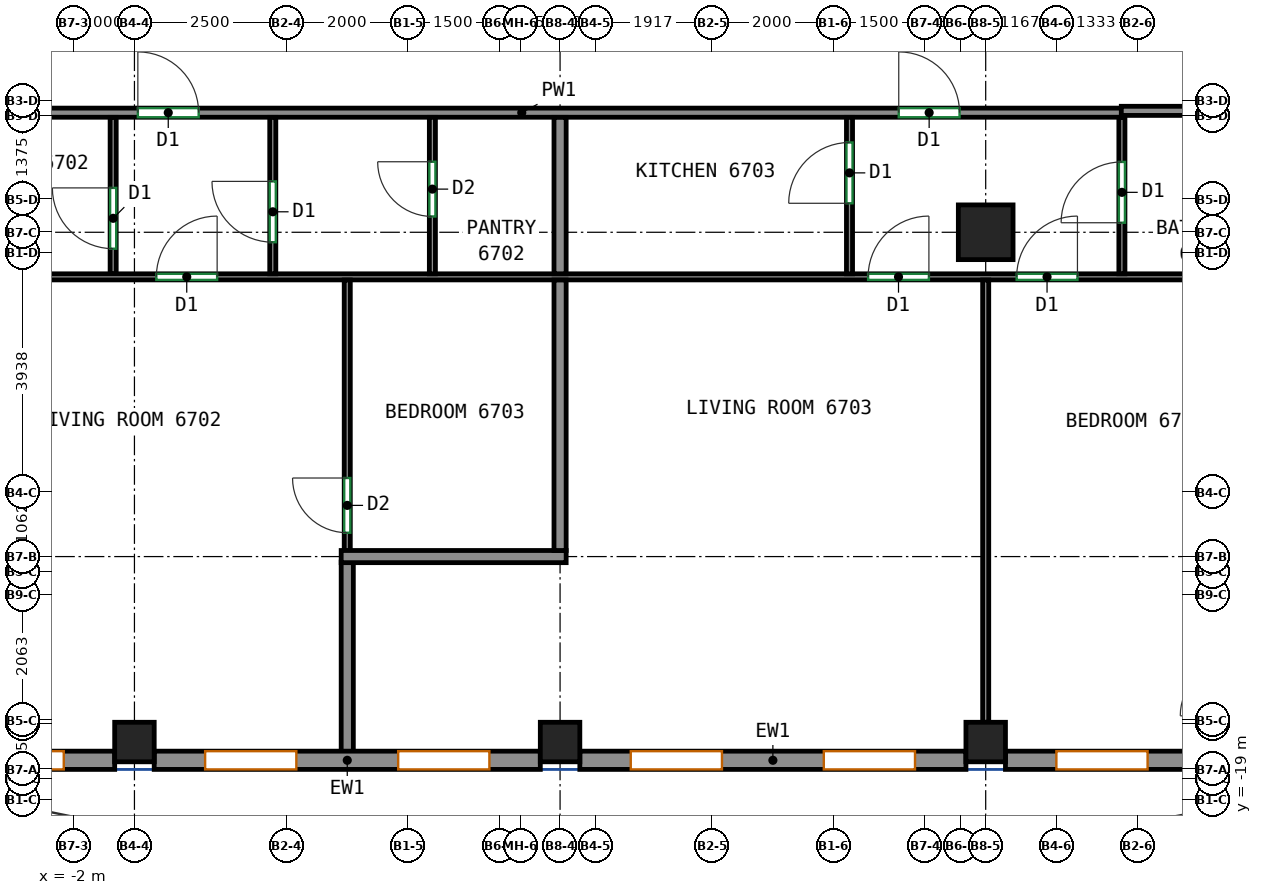
"""IFC4 building model, lengths in metres.
Left out: names, types, materials, properties, quantities, classifications, styles, units other than length and angle.
Written with IfcOpenShell. Run it as: python <this file> out.ifc"""

import sys

from ifc_helpers import new_model, si_unit, direction, frame, frame_2d, origin, origin_2d, place, context, subcontext, project, spatial, rectangle, extrude, source, transform, mapped, element, fill, save


model = new_model("IFC4")
c1 = context("Model", 3, precision=1e-05, world=origin(), true_north=direction((0.0, 1.0)))
c2 = subcontext(c1, "Body", "Model", "MODEL_VIEW")
j1 = project(units=[si_unit("LENGTHUNIT", "METRE"), si_unit("PLANEANGLEUNIT", "RADIAN")], contexts=[c1])
p1 = place(None, origin())
s1 = spatial("IfcSite", under=j1, at=p1, CompositionType="ELEMENT")
p2 = place(p1, origin())
s2 = spatial("IfcBuilding", under=s1, at=p2, CompositionType="ELEMENT")
p3 = place(p2, frame((0.0, 0.0, 273.8)))
s3 = spatial("IfcBuildingStorey", under=s2, at=p3, CompositionType="ELEMENT", Elevation=273.8)
m1 = source(origin(), c2, "Body", "SweptSolid", [
    extrude(rectangle(XDim=0.65, YDim=0.65, at=origin_2d()), origin(), (0.0, 0.0, 1.0), 3.12),
])
for number, where, z_axis, x_axis in (
    (1, (-1.0, -18.05, 0.0), (0.0, 0.0, 1.0), (1.0, 0.0, 0.0)),
    (2, (6.0, -18.05, 0.0), (0.0, 0.0, 1.0), (1.0, 0.0, 0.0)),
    (3, (13.0, -18.05, 0.0), (0.0, 0.0, 1.0), (1.0, 0.0, 0.0)),
):
    element("IfcColumn", number, at=place(p3, frame(where, z_axis=z_axis, x_axis=x_axis)), inside=s3, PredefinedType="COLUMN", context=c2, shape_type="MappedRepresentation", body=[
        mapped(m1, transform((0.0, 0.0, 0.0))),
    ])
m2 = source(origin(), c2, "Body", "SweptSolid", [
    extrude(rectangle(XDim=0.9, YDim=0.9, at=origin_2d()), origin(), (0.0, 0.0, 1.0), 3.12),
])
p4 = place(p3, frame((13.0, -9.667, 0.0), z_axis=(0.0, 0.0, 1.0), x_axis=(1.0, 0.0, 0.0)))
e4 = element("IfcColumn", 4, at=p4, inside=s3, PredefinedType="COLUMN", context=c2, shape_type="MappedRepresentation", body=[
    mapped(m2, transform((0.0, 0.0, 0.0))),
])
m3 = source(origin(), c2, "Body", "SweptSolid", [
    extrude(rectangle(XDim=6.35, YDim=0.3, at=frame_2d((3.175, 0.0))), origin(), (0.0, 0.0, 1.0), 3.12),
])
p5 = place(p3, frame((-7.675, -18.35, 0.0), z_axis=(0.0, 0.0, 1.0), x_axis=(1.0, 0.0, 0.0)))
e5 = element("IfcWall", 5, at=p5, inside=s3, PredefinedType="SOLIDWALL", context=c2, shape_type="MappedRepresentation", body=[
    mapped(m3, transform((0.0, 0.0, 0.0))),
])
p6 = place(p5, frame((0.837, 0.0, 0.8)))
e6 = element("IfcOpeningElement", 6, at=p6, cuts=e5, PredefinedType="OPENING", context=c2, shape_type="SweptSolid", body=[
    extrude(rectangle(XDim=1.5, YDim=2.05, at=frame_2d((0.75, 1.025))), frame((0.0, 0.16, 0.0), z_axis=(0.0, -1.0, 0.0), x_axis=(1.0, 0.0, 0.0)), (0.0, 0.0, 1.0), 0.32),
])
p7 = place(p5, frame((4.012, 0.0, 0.8)))
e7 = element("IfcOpeningElement", 7, at=p7, cuts=e5, PredefinedType="OPENING", context=c2, shape_type="SweptSolid", body=[
    extrude(rectangle(XDim=1.5, YDim=2.05, at=frame_2d((0.75, 1.025))), frame((0.0, 0.16, 0.0), z_axis=(0.0, -1.0, 0.0), x_axis=(1.0, 0.0, 0.0)), (0.0, 0.0, 1.0), 0.32),
])
p8 = place(p3, frame((-0.675, -18.35, 0.0), z_axis=(0.0, 0.0, 1.0), x_axis=(1.0, 0.0, 0.0)))
e8 = element("IfcWall", 8, at=p8, inside=s3, PredefinedType="SOLIDWALL", context=c2, shape_type="MappedRepresentation", body=[
    mapped(m3, transform((0.0, 0.0, 0.0))),
])
p9 = place(p8, frame((0.837, 0.0, 0.8)))
e9 = element("IfcOpeningElement", 9, at=p9, cuts=e8, PredefinedType="OPENING", context=c2, shape_type="SweptSolid", body=[
    extrude(rectangle(XDim=1.5, YDim=2.05, at=frame_2d((0.75, 1.025))), frame((0.0, 0.16, 0.0), z_axis=(0.0, -1.0, 0.0), x_axis=(1.0, 0.0, 0.0)), (0.0, 0.0, 1.0), 0.32),
])
p10 = place(p8, frame((4.012, 0.0, 0.8)))
e10 = element("IfcOpeningElement", 10, at=p10, cuts=e8, PredefinedType="OPENING", context=c2, shape_type="SweptSolid", body=[
    extrude(rectangle(XDim=1.5, YDim=2.05, at=frame_2d((0.75, 1.025))), frame((0.0, 0.16, 0.0), z_axis=(0.0, -1.0, 0.0), x_axis=(1.0, 0.0, 0.0)), (0.0, 0.0, 1.0), 0.32),
])
p11 = place(p3, frame((6.325, -18.35, 0.0), z_axis=(0.0, 0.0, 1.0), x_axis=(1.0, 0.0, 0.0)))
e11 = element("IfcWall", 11, at=p11, inside=s3, PredefinedType="SOLIDWALL", context=c2, shape_type="MappedRepresentation", body=[
    mapped(m3, transform((0.0, 0.0, 0.0))),
])
p12 = place(p11, frame((0.837, 0.0, 0.8)))
e12 = element("IfcOpeningElement", 12, at=p12, cuts=e11, PredefinedType="OPENING", context=c2, shape_type="SweptSolid", body=[
    extrude(rectangle(XDim=1.5, YDim=2.05, at=frame_2d((0.75, 1.025))), frame((0.0, 0.16, 0.0), z_axis=(0.0, -1.0, 0.0), x_axis=(1.0, 0.0, 0.0)), (0.0, 0.0, 1.0), 0.32),
])
p13 = place(p11, frame((4.012, 0.0, 0.8)))
e13 = element("IfcOpeningElement", 13, at=p13, cuts=e11, PredefinedType="OPENING", context=c2, shape_type="SweptSolid", body=[
    extrude(rectangle(XDim=1.5, YDim=2.05, at=frame_2d((0.75, 1.025))), frame((0.0, 0.16, 0.0), z_axis=(0.0, -1.0, 0.0), x_axis=(1.0, 0.0, 0.0)), (0.0, 0.0, 1.0), 0.32),
])
p14 = place(p3, frame((13.325, -18.35, 0.0), z_axis=(0.0, 0.0, 1.0), x_axis=(1.0, 0.0, 0.0)))
e14 = element("IfcWall", 14, at=p14, inside=s3, PredefinedType="SOLIDWALL", context=c2, shape_type="MappedRepresentation", body=[
    mapped(m3, transform((0.0, 0.0, 0.0))),
])
p15 = place(p14, frame((0.837, 0.0, 0.8)))
e15 = element("IfcOpeningElement", 15, at=p15, cuts=e14, PredefinedType="OPENING", context=c2, shape_type="SweptSolid", body=[
    extrude(rectangle(XDim=1.5, YDim=2.05, at=frame_2d((0.75, 1.025))), frame((0.0, 0.16, 0.0), z_axis=(0.0, -1.0, 0.0), x_axis=(1.0, 0.0, 0.0)), (0.0, 0.0, 1.0), 0.32),
])
p16 = place(p14, frame((4.012, 0.0, 0.8)))
e16 = element("IfcOpeningElement", 16, at=p16, cuts=e14, PredefinedType="OPENING", context=c2, shape_type="SweptSolid", body=[
    extrude(rectangle(XDim=1.5, YDim=2.05, at=frame_2d((0.75, 1.025))), frame((0.0, 0.16, 0.0), z_axis=(0.0, -1.0, 0.0), x_axis=(1.0, 0.0, 0.0)), (0.0, 0.0, 1.0), 0.32),
])
p17 = place(p3, frame((-4.51, -7.7, 0.0), z_axis=(0.0, 0.0, 1.0), x_axis=(1.0, 0.0, 0.0)))
e17 = element("IfcWall", 17, at=p17, inside=s3, PredefinedType="PARTITIONING", context=c2, shape_type="SweptSolid", body=[
    extrude(rectangle(XDim=19.76, YDim=0.15, at=frame_2d((9.88, 0.0))), origin(), (0.0, 0.0, 1.0), 3.12),
])
p18 = place(p17, frame((3.566, 0.0, 0.0)))
e18 = element("IfcOpeningElement", 18, at=p18, cuts=e17, PredefinedType="OPENING", context=c2, shape_type="SweptSolid", body=[
    extrude(rectangle(XDim=1.0, YDim=2.1, at=frame_2d((0.5, 1.05))), frame((0.0, 0.085, 0.0), z_axis=(0.0, -1.0, 0.0), x_axis=(1.0, 0.0, 0.0)), (0.0, 0.0, 1.0), 0.17),
])
p19 = place(p17, frame((16.08, 0.0, 0.0)))
e19 = element("IfcOpeningElement", 19, at=p19, cuts=e17, PredefinedType="OPENING", context=c2, shape_type="SweptSolid", body=[
    extrude(rectangle(XDim=1.0, YDim=2.1, at=frame_2d((0.5, 1.05))), frame((0.0, 0.085, 0.0), z_axis=(0.0, -1.0, 0.0), x_axis=(1.0, 0.0, 0.0)), (0.0, 0.0, 1.0), 0.17),
])
p20 = place(p3, frame((15.23, -7.67, 0.0), z_axis=(0.0, 0.0, 1.0), x_axis=(1.0, 0.0, 0.0)))
e20 = element("IfcWall", 20, at=p20, inside=s3, PredefinedType="PARTITIONING", context=c2, shape_type="SweptSolid", body=[
    extrude(rectangle(XDim=3.87, YDim=0.15, at=frame_2d((1.935, 0.0))), origin(), (0.0, 0.0, 1.0), 3.12),
])
p21 = place(p3, frame((-1.35, -10.35, 0.0), z_axis=(0.0, 0.0, 1.0), x_axis=(0.0, 1.0, 0.0)))
e21 = element("IfcWall", 21, at=p21, inside=s3, PredefinedType="PARTITIONING", context=c2, shape_type="SweptSolid", body=[
    extrude(rectangle(XDim=2.573, YDim=0.1, at=frame_2d((1.287, 0.0))), origin(), (0.0, 0.0, 1.0), 3.12),
])
p22 = place(p21, frame((0.413, 0.0, 0.0)))
e22 = element("IfcOpeningElement", 22, at=p22, cuts=e21, PredefinedType="OPENING", context=c2, shape_type="SweptSolid", body=[
    extrude(rectangle(XDim=1.0, YDim=2.1, at=frame_2d((0.5, 1.05))), frame((0.0, 0.06, 0.0), z_axis=(0.0, -1.0, 0.0), x_axis=(1.0, 0.0, 0.0)), (0.0, 0.0, 1.0), 0.12),
])
p23 = place(p3, frame((-4.6, -10.4, 0.0), z_axis=(0.0, 0.0, 1.0), x_axis=(1.0, 0.0, 0.0)))
e23 = element("IfcWall", 23, at=p23, inside=s3, PredefinedType="PARTITIONING", context=c2, shape_type="SweptSolid", body=[
    extrude(rectangle(XDim=22.35, YDim=0.1, at=frame_2d((11.175, 0.0))), origin(), (0.0, 0.0, 1.0), 3.12),
])
p24 = place(p23, frame((3.96, 0.0, 0.0)))
e24 = element("IfcOpeningElement", 24, at=p24, cuts=e23, PredefinedType="OPENING", context=c2, shape_type="SweptSolid", body=[
    extrude(rectangle(XDim=1.0, YDim=2.1, at=frame_2d((0.5, 1.05))), frame((0.0, 0.06, 0.0), z_axis=(0.0, -1.0, 0.0), x_axis=(1.0, 0.0, 0.0)), (0.0, 0.0, 1.0), 0.12),
])
p25 = place(p23, frame((15.666, 0.0, 0.0)))
e25 = element("IfcOpeningElement", 25, at=p25, cuts=e23, PredefinedType="OPENING", context=c2, shape_type="SweptSolid", body=[
    extrude(rectangle(XDim=1.0, YDim=2.1, at=frame_2d((0.5, 1.05))), frame((0.0, 0.06, 0.0), z_axis=(0.0, -1.0, 0.0), x_axis=(1.0, 0.0, 0.0)), (0.0, 0.0, 1.0), 0.12),
])
p26 = place(p23, frame((18.109, 0.0, 0.0)))
e26 = element("IfcOpeningElement", 26, at=p26, cuts=e23, PredefinedType="OPENING", context=c2, shape_type="SweptSolid", body=[
    extrude(rectangle(XDim=1.0, YDim=2.1, at=frame_2d((0.5, 1.05))), frame((0.0, 0.06, 0.0), z_axis=(0.0, -1.0, 0.0), x_axis=(1.0, 0.0, 0.0)), (0.0, 0.0, 1.0), 0.12),
])
p27 = place(p3, frame((1.275, -10.35, 0.0), z_axis=(0.0, 0.0, 1.0), x_axis=(0.0, 1.0, 0.0)))
e27 = element("IfcWall", 27, at=p27, inside=s3, PredefinedType="PARTITIONING", context=c2, shape_type="SweptSolid", body=[
    extrude(rectangle(XDim=2.573, YDim=0.1, at=frame_2d((1.287, 0.0))), origin(), (0.0, 0.0, 1.0), 3.12),
])
p28 = place(p27, frame((0.52, 0.0, 0.0)))
e28 = element("IfcOpeningElement", 28, at=p28, cuts=e27, PredefinedType="OPENING", context=c2, shape_type="SweptSolid", body=[
    extrude(rectangle(XDim=1.0, YDim=2.1, at=frame_2d((0.5, 1.05))), frame((0.0, 0.06, 0.0), z_axis=(0.0, -1.0, 0.0), x_axis=(1.0, 0.0, 0.0)), (0.0, 0.0, 1.0), 0.12),
])
p29 = place(p3, frame((3.9, -10.35, 0.0), z_axis=(0.0, 0.0, 1.0), x_axis=(0.0, 1.0, 0.0)))
e29 = element("IfcWall", 29, at=p29, inside=s3, PredefinedType="PARTITIONING", context=c2, shape_type="SweptSolid", body=[
    extrude(rectangle(XDim=2.573, YDim=0.1, at=frame_2d((1.287, 0.0))), origin(), (0.0, 0.0, 1.0), 3.12),
])
p30 = place(p29, frame((0.943, 0.0, 0.0)))
e30 = element("IfcOpeningElement", 30, at=p30, cuts=e29, PredefinedType="OPENING", context=c2, shape_type="SweptSolid", body=[
    extrude(rectangle(XDim=0.9, YDim=2.1, at=frame_2d((0.45, 1.05))), frame((0.0, 0.06, 0.0), z_axis=(0.0, -1.0, 0.0), x_axis=(1.0, 0.0, 0.0)), (0.0, 0.0, 1.0), 0.12),
])
p31 = place(p3, frame((6.0, -10.35, 0.0), z_axis=(0.0, 0.0, 1.0), x_axis=(0.0, 1.0, 0.0)))
e31 = element("IfcWall", 31, at=p31, inside=s3, PredefinedType="PARTITIONING", context=c2, shape_type="SweptSolid", body=[
    extrude(rectangle(XDim=2.573, YDim=0.2, at=frame_2d((1.287, 0.0))), origin(), (0.0, 0.0, 1.0), 3.12),
])
p32 = place(p3, frame((2.5, -14.91, 0.0), z_axis=(0.0, 0.0, 1.0), x_axis=(0.0, 1.0, 0.0)))
e32 = element("IfcWall", 32, at=p32, inside=s3, PredefinedType="PARTITIONING", context=c2, shape_type="SweptSolid", body=[
    extrude(rectangle(XDim=4.458, YDim=0.1, at=frame_2d((2.229, 0.0))), origin(), (0.0, 0.0, 1.0), 3.12),
])
p33 = place(p32, frame((0.302, 0.0, 0.0)))
e33 = element("IfcOpeningElement", 33, at=p33, cuts=e32, PredefinedType="OPENING", context=c2, shape_type="SweptSolid", body=[
    extrude(rectangle(XDim=0.9, YDim=2.1, at=frame_2d((0.45, 1.05))), frame((0.0, 0.06, 0.0), z_axis=(0.0, -1.0, 0.0), x_axis=(1.0, 0.0, 0.0)), (0.0, 0.0, 1.0), 0.12),
])
p34 = place(p3, frame((2.5, -18.25, 0.0), z_axis=(0.0, 0.0, 1.0), x_axis=(0.0, 1.0, 0.0)))
e34 = element("IfcWall", 34, at=p34, inside=s3, PredefinedType="PARTITIONING", context=c2, shape_type="SweptSolid", body=[
    extrude(rectangle(XDim=3.16, YDim=0.2, at=frame_2d((1.58, 0.0))), origin(), (0.0, 0.0, 1.0), 3.12),
])
p35 = place(p3, frame((2.4, -15.0, 0.0), z_axis=(0.0, 0.0, 1.0), x_axis=(1.0, 0.0, 0.0)))
e35 = element("IfcWall", 35, at=p35, inside=s3, PredefinedType="PARTITIONING", context=c2, shape_type="SweptSolid", body=[
    extrude(rectangle(XDim=3.7, YDim=0.2, at=frame_2d((1.85, 0.0))), origin(), (0.0, 0.0, 1.0), 3.12),
])
p36 = place(p3, frame((6.0, -14.9, 0.0), z_axis=(0.0, 0.0, 1.0), x_axis=(0.0, 1.0, 0.0)))
e36 = element("IfcWall", 36, at=p36, inside=s3, PredefinedType="PARTITIONING", context=c2, shape_type="SweptSolid", body=[
    extrude(rectangle(XDim=4.448, YDim=0.2, at=frame_2d((2.224, 0.0))), origin(), (0.0, 0.0, 1.0), 3.12),
])
p37 = place(p3, frame((10.76, -10.35, 0.0), z_axis=(0.0, 0.0, 1.0), x_axis=(0.0, 1.0, 0.0)))
e37 = element("IfcWall", 37, at=p37, inside=s3, PredefinedType="PARTITIONING", context=c2, shape_type="SweptSolid", body=[
    extrude(rectangle(XDim=2.573, YDim=0.1, at=frame_2d((1.287, 0.0))), origin(), (0.0, 0.0, 1.0), 3.12),
])
p38 = place(p37, frame((1.16, 0.0, 0.0)))
e38 = element("IfcOpeningElement", 38, at=p38, cuts=e37, PredefinedType="OPENING", context=c2, shape_type="SweptSolid", body=[
    extrude(rectangle(XDim=1.0, YDim=2.1, at=frame_2d((0.5, 1.05))), frame((0.0, 0.06, 0.0), z_axis=(0.0, -1.0, 0.0), x_axis=(1.0, 0.0, 0.0)), (0.0, 0.0, 1.0), 0.12),
])
p39 = place(p3, frame((15.24, -10.35, 0.0), z_axis=(0.0, 0.0, 1.0), x_axis=(0.0, 1.0, 0.0)))
e39 = element("IfcWall", 39, at=p39, inside=s3, PredefinedType="PARTITIONING", context=c2, shape_type="SweptSolid", body=[
    extrude(rectangle(XDim=2.573, YDim=0.1, at=frame_2d((1.287, 0.0))), origin(), (0.0, 0.0, 1.0), 3.12),
])
p40 = place(p39, frame((0.84, 0.0, 0.0)))
e40 = element("IfcOpeningElement", 40, at=p40, cuts=e39, PredefinedType="OPENING", context=c2, shape_type="SweptSolid", body=[
    extrude(rectangle(XDim=1.0, YDim=2.1, at=frame_2d((0.5, 1.05))), frame((0.0, 0.06, 0.0), z_axis=(0.0, -1.0, 0.0), x_axis=(1.0, 0.0, 0.0)), (0.0, 0.0, 1.0), 0.12),
])
p41 = place(p3, frame((13.0, -17.725, 0.0), z_axis=(0.0, 0.0, 1.0), x_axis=(0.0, 1.0, 0.0)))
e41 = element("IfcWall", 41, at=p41, inside=s3, PredefinedType="PARTITIONING", context=c2, shape_type="SweptSolid", body=[
    extrude(rectangle(XDim=7.273, YDim=0.1, at=frame_2d((3.637, 0.0))), origin(), (0.0, 0.0, 1.0), 3.12),
])
p42 = place(p7, origin())
e42 = element("IfcWindow", 42, at=p42, inside=s3, PartitioningType="SINGLE_PANEL", PredefinedType="WINDOW", context=c2, shape_type="SweptSolid", body=[
    extrude(rectangle(XDim=1.5, YDim=2.05, at=frame_2d((0.75, 1.025))), frame((0.0, 0.03, 0.0), z_axis=(0.0, -1.0, 0.0), x_axis=(1.0, 0.0, 0.0)), (0.0, 0.0, 1.0), 0.06),
])
fill(e7, e42)
p43 = place(p9, origin())
e43 = element("IfcWindow", 43, at=p43, inside=s3, PartitioningType="SINGLE_PANEL", PredefinedType="WINDOW", context=c2, shape_type="SweptSolid", body=[
    extrude(rectangle(XDim=1.5, YDim=2.05, at=frame_2d((0.75, 1.025))), frame((0.0, 0.03, 0.0), z_axis=(0.0, -1.0, 0.0), x_axis=(1.0, 0.0, 0.0)), (0.0, 0.0, 1.0), 0.06),
])
fill(e9, e43)
p44 = place(p10, origin())
e44 = element("IfcWindow", 44, at=p44, inside=s3, PartitioningType="SINGLE_PANEL", PredefinedType="WINDOW", context=c2, shape_type="SweptSolid", body=[
    extrude(rectangle(XDim=1.5, YDim=2.05, at=frame_2d((0.75, 1.025))), frame((0.0, 0.03, 0.0), z_axis=(0.0, -1.0, 0.0), x_axis=(1.0, 0.0, 0.0)), (0.0, 0.0, 1.0), 0.06),
])
fill(e10, e44)
p45 = place(p12, origin())
e45 = element("IfcWindow", 45, at=p45, inside=s3, PartitioningType="SINGLE_PANEL", PredefinedType="WINDOW", context=c2, shape_type="SweptSolid", body=[
    extrude(rectangle(XDim=1.5, YDim=2.05, at=frame_2d((0.75, 1.025))), frame((0.0, 0.03, 0.0), z_axis=(0.0, -1.0, 0.0), x_axis=(1.0, 0.0, 0.0)), (0.0, 0.0, 1.0), 0.06),
])
fill(e12, e45)
p46 = place(p13, origin())
e46 = element("IfcWindow", 46, at=p46, inside=s3, PartitioningType="SINGLE_PANEL", PredefinedType="WINDOW", context=c2, shape_type="SweptSolid", body=[
    extrude(rectangle(XDim=1.5, YDim=2.05, at=frame_2d((0.75, 1.025))), frame((0.0, 0.03, 0.0), z_axis=(0.0, -1.0, 0.0), x_axis=(1.0, 0.0, 0.0)), (0.0, 0.0, 1.0), 0.06),
])
fill(e13, e46)
p47 = place(p15, origin())
e47 = element("IfcWindow", 47, at=p47, inside=s3, PartitioningType="SINGLE_PANEL", PredefinedType="WINDOW", context=c2, shape_type="SweptSolid", body=[
    extrude(rectangle(XDim=1.5, YDim=2.05, at=frame_2d((0.75, 1.025))), frame((0.0, 0.03, 0.0), z_axis=(0.0, -1.0, 0.0), x_axis=(1.0, 0.0, 0.0)), (0.0, 0.0, 1.0), 0.06),
])
fill(e15, e47)
p48 = place(p33, origin())
e48 = element("IfcDoor", 48, at=p48, inside=s3, OperationType="SINGLE_SWING_RIGHT", PredefinedType="DOOR", context=c2, shape_type="SweptSolid", body=[
    extrude(rectangle(XDim=0.9, YDim=2.1, at=frame_2d((0.45, 1.05))), frame((0.0, 0.025, 0.0), z_axis=(0.0, -1.0, 0.0), x_axis=(1.0, 0.0, 0.0)), (0.0, 0.0, 1.0), 0.05),
])
fill(e33, e48)
p49 = place(p24, origin())
e49 = element("IfcDoor", 49, at=p49, inside=s3, OperationType="SINGLE_SWING_RIGHT", PredefinedType="DOOR", context=c2, shape_type="SweptSolid", body=[
    extrude(rectangle(XDim=1.0, YDim=2.1, at=frame_2d((0.5, 1.05))), frame((0.0, 0.025, 0.0), z_axis=(0.0, -1.0, 0.0), x_axis=(1.0, 0.0, 0.0)), (0.0, 0.0, 1.0), 0.05),
])
fill(e24, e49)
p50 = place(p25, origin())
e50 = element("IfcDoor", 50, at=p50, inside=s3, OperationType="SINGLE_SWING_RIGHT", PredefinedType="DOOR", context=c2, shape_type="SweptSolid", body=[
    extrude(rectangle(XDim=1.0, YDim=2.1, at=frame_2d((0.5, 1.05))), frame((0.0, 0.025, 0.0), z_axis=(0.0, -1.0, 0.0), x_axis=(1.0, 0.0, 0.0)), (0.0, 0.0, 1.0), 0.05),
])
fill(e25, e50)
p51 = place(p26, origin())
e51 = element("IfcDoor", 51, at=p51, inside=s3, OperationType="SINGLE_SWING_RIGHT", PredefinedType="DOOR", context=c2, shape_type="SweptSolid", body=[
    extrude(rectangle(XDim=1.0, YDim=2.1, at=frame_2d((0.5, 1.05))), frame((0.0, 0.025, 0.0), z_axis=(0.0, -1.0, 0.0), x_axis=(1.0, 0.0, 0.0)), (0.0, 0.0, 1.0), 0.05),
])
fill(e26, e51)
p52 = place(p22, origin())
e52 = element("IfcDoor", 52, at=p52, inside=s3, OperationType="SINGLE_SWING_RIGHT", PredefinedType="DOOR", context=c2, shape_type="SweptSolid", body=[
    extrude(rectangle(XDim=1.0, YDim=2.1, at=frame_2d((0.5, 1.05))), frame((0.0, 0.025, 0.0), z_axis=(0.0, -1.0, 0.0), x_axis=(1.0, 0.0, 0.0)), (0.0, 0.0, 1.0), 0.05),
])
fill(e22, e52)
p53 = place(p28, origin())
e53 = element("IfcDoor", 53, at=p53, inside=s3, OperationType="SINGLE_SWING_RIGHT", PredefinedType="DOOR", context=c2, shape_type="SweptSolid", body=[
    extrude(rectangle(XDim=1.0, YDim=2.1, at=frame_2d((0.5, 1.05))), frame((0.0, 0.025, 0.0), z_axis=(0.0, -1.0, 0.0), x_axis=(1.0, 0.0, 0.0)), (0.0, 0.0, 1.0), 0.05),
])
fill(e28, e53)
p54 = place(p40, origin())
e54 = element("IfcDoor", 54, at=p54, inside=s3, OperationType="SINGLE_SWING_LEFT", PredefinedType="DOOR", context=c2, shape_type="SweptSolid", body=[
    extrude(rectangle(XDim=1.0, YDim=2.1, at=frame_2d((0.5, 1.05))), frame((0.0, 0.025, 0.0), z_axis=(0.0, -1.0, 0.0), x_axis=(1.0, 0.0, 0.0)), (0.0, 0.0, 1.0), 0.05),
])
fill(e40, e54)
p55 = place(p30, origin())
e55 = element("IfcDoor", 55, at=p55, inside=s3, OperationType="SINGLE_SWING_RIGHT", PredefinedType="DOOR", context=c2, shape_type="SweptSolid", body=[
    extrude(rectangle(XDim=0.9, YDim=2.1, at=frame_2d((0.45, 1.05))), frame((0.0, 0.025, 0.0), z_axis=(0.0, -1.0, 0.0), x_axis=(1.0, 0.0, 0.0)), (0.0, 0.0, 1.0), 0.05),
])
fill(e30, e55)
p56 = place(p38, origin())
e56 = element("IfcDoor", 56, at=p56, inside=s3, OperationType="SINGLE_SWING_LEFT", PredefinedType="DOOR", context=c2, shape_type="SweptSolid", body=[
    extrude(rectangle(XDim=1.0, YDim=2.1, at=frame_2d((0.5, 1.05))), frame((0.0, 0.025, 0.0), z_axis=(0.0, -1.0, 0.0), x_axis=(1.0, 0.0, 0.0)), (0.0, 0.0, 1.0), 0.05),
])
fill(e38, e56)
p57 = place(p18, origin())
e57 = element("IfcDoor", 57, at=p57, inside=s3, OperationType="SINGLE_SWING_LEFT", PredefinedType="DOOR", context=c2, shape_type="SweptSolid", body=[
    extrude(rectangle(XDim=1.0, YDim=2.1, at=frame_2d((0.5, 1.05))), frame((0.0, 0.025, 0.0), z_axis=(0.0, -1.0, 0.0), x_axis=(1.0, 0.0, 0.0)), (0.0, 0.0, 1.0), 0.05),
])
fill(e18, e57)
p58 = place(p19, origin())
e58 = element("IfcDoor", 58, at=p58, inside=s3, OperationType="SINGLE_SWING_LEFT", PredefinedType="DOOR", context=c2, shape_type="SweptSolid", body=[
    extrude(rectangle(XDim=1.0, YDim=2.1, at=frame_2d((0.5, 1.05))), frame((0.0, 0.025, 0.0), z_axis=(0.0, -1.0, 0.0), x_axis=(1.0, 0.0, 0.0)), (0.0, 0.0, 1.0), 0.05),
])
fill(e19, e58)
save(model, sys.argv[1])
